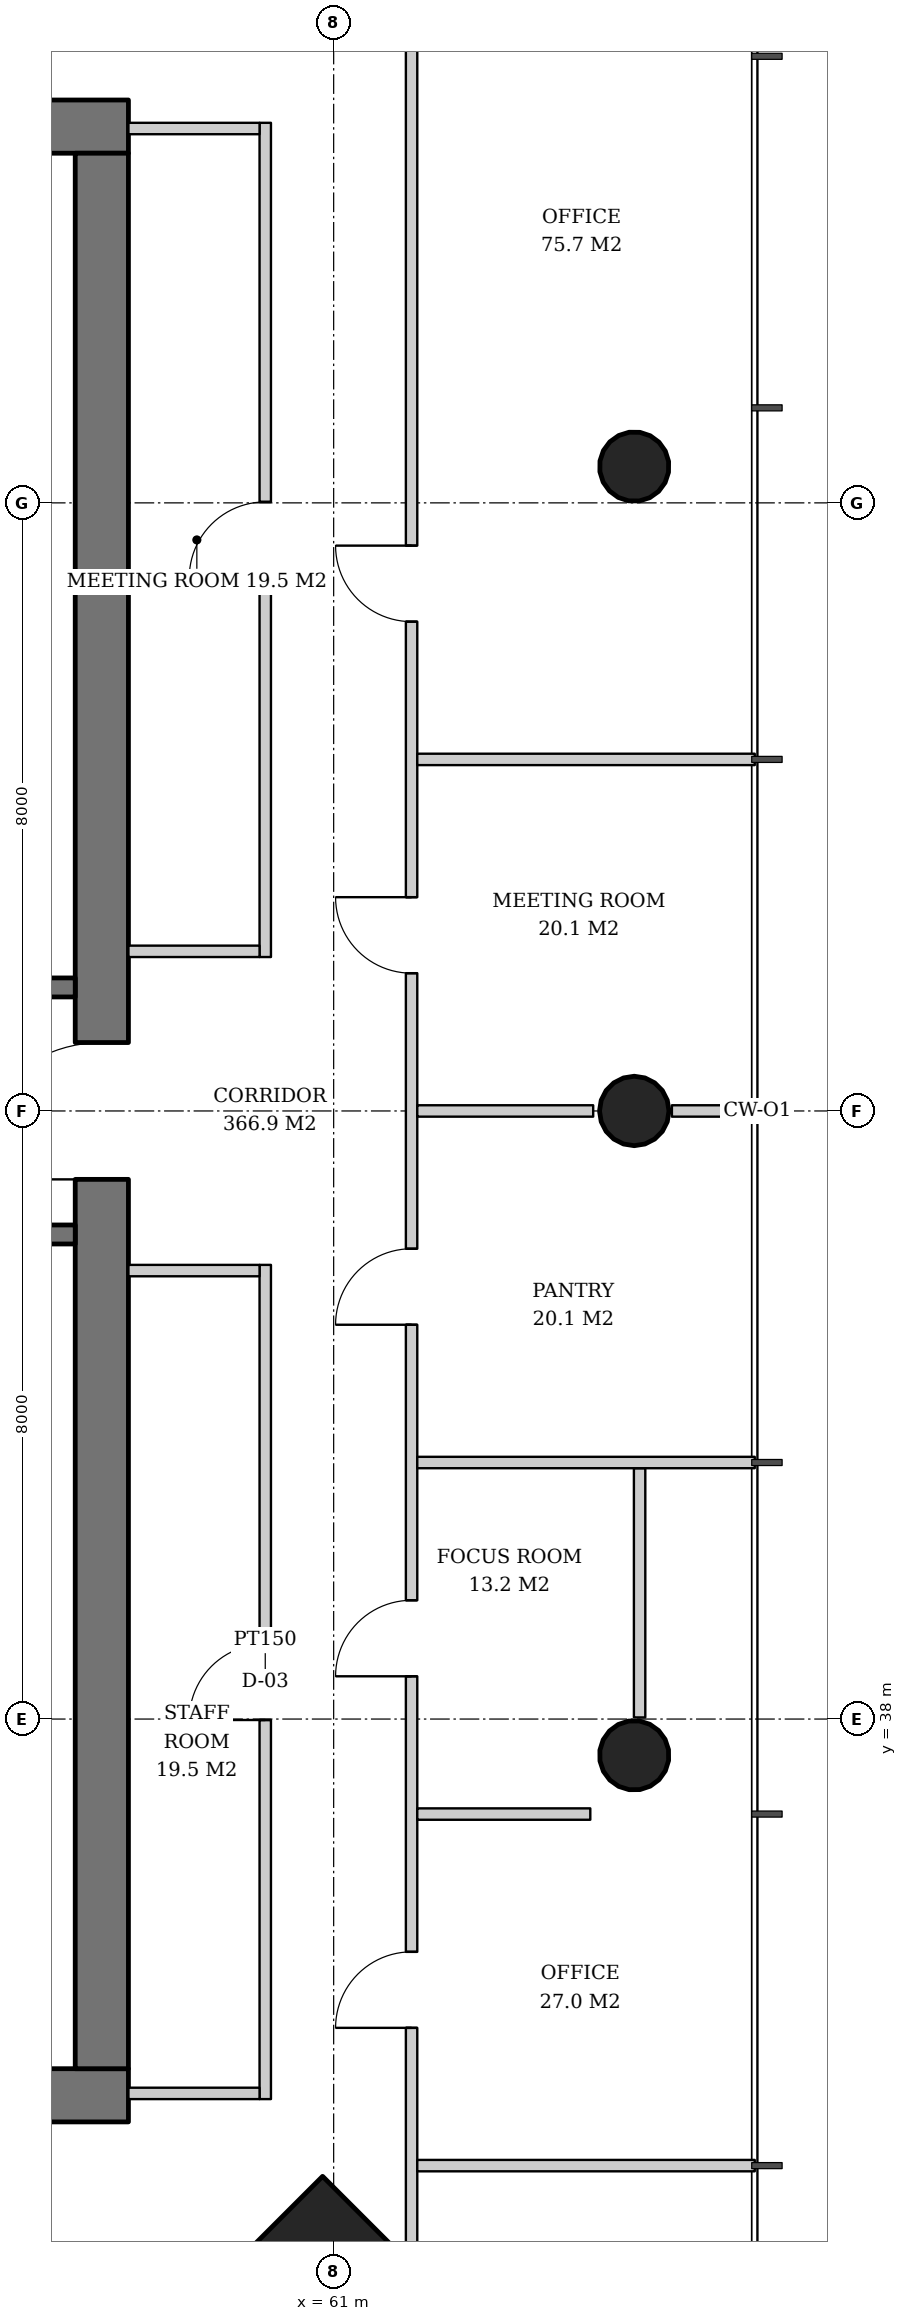
"""IFC4 building model, lengths in metres.
Left out: names, types, materials, properties, quantities, classifications, styles, units other than length and angle.
Written with IfcOpenShell. Run it as: python <this file> out.ifc"""

import sys

from ifc_helpers import new_model, si_unit, direction, frame, frame_2d, origin, origin_2d, place, context, subcontext, project, spatial, rectangle, hollow_circle, extrude, element, fill, save


model = new_model("IFC4")
c1 = context("Model", 3, precision=1e-05, world=origin(), true_north=direction((0.0, 1.0)))
c2 = subcontext(c1, "Body", "Model", "MODEL_VIEW")
j1 = project(units=[si_unit("LENGTHUNIT", "METRE"), si_unit("PLANEANGLEUNIT", "RADIAN")], contexts=[c1])
p1 = place(None, origin())
s1 = spatial("IfcSite", under=j1, at=p1, CompositionType="ELEMENT")
p2 = place(p1, origin())
s2 = spatial("IfcBuilding", under=s1, at=p2, CompositionType="ELEMENT")
p3 = place(p2, frame((0.0, 0.0, 146.4)))
s3 = spatial("IfcBuildingStorey", under=s2, at=p3, CompositionType="ELEMENT", Elevation=146.4)
p4 = place(p3, frame((64.993, 37.504, 0.0), z_axis=(-0.031974442509, 0.015923015547, 0.999361842679), x_axis=(-0.445775033553, -0.895145027055, 0.0)))
e1 = element("IfcColumn", 1, at=p4, inside=s3, PredefinedType="COLUMN", context=c2, shape_type="SweptSolid", body=[
    extrude(hollow_circle(Radius=0.457, WallThickness=0.03, at=origin_2d()), origin(), (0.0, 0.0, 1.0), 3.802),
])
p5 = place(p3, frame((64.993, 46.0, 0.0), z_axis=(-0.031978496719, 0.0, 0.999488557087), x_axis=(0.0, -1.0, 0.0)))
e2 = element("IfcColumn", 2, at=p5, inside=s3, PredefinedType="COLUMN", context=c2, shape_type="SweptSolid", body=[
    extrude(hollow_circle(Radius=0.457, WallThickness=0.03, at=origin_2d()), origin(), (0.0, 0.0, 1.0), 3.802),
])
p6 = place(p3, frame((64.993, 54.496, 0.0), z_axis=(-0.031974442509, -0.015923015547, 0.999361842679), x_axis=(0.445775033553, -0.895145027055, 0.0)))
e3 = element("IfcColumn", 3, at=p6, inside=s3, PredefinedType="COLUMN", context=c2, shape_type="SweptSolid", body=[
    extrude(hollow_circle(Radius=0.457, WallThickness=0.03, at=origin_2d()), origin(), (0.0, 0.0, 1.0), 3.802),
])
p7 = place(p3, frame((60.893, 30.107, 0.0), z_axis=(-0.031898107953, 0.031898107953, 0.998981992539), x_axis=(-0.707106781187, -0.707106781187, 0.0)))
e4 = element("IfcColumn", 4, at=p7, inside=s3, PredefinedType="COLUMN", context=c2, shape_type="SweptSolid", body=[
    extrude(rectangle(XDim=2.6, YDim=2.6, at=origin_2d()), origin(), (0.0, 0.0, 1.0), 3.804),
])
p8 = place(p3, frame((31.7, 33.05, 0.0), z_axis=(0.0, 0.0, 1.0), x_axis=(1.0, 0.0, 0.0)))
e5 = element("IfcWall", 5, at=p8, inside=s3, PredefinedType="SHEAR", context=c2, shape_type="SweptSolid", body=[
    extrude(rectangle(XDim=26.6, YDim=0.7, at=frame_2d((13.3, 0.0))), origin(), (0.0, 0.0, 1.0), 3.8),
])
p9 = place(p8, frame((7.3, 0.0, 0.0)))
e6 = element("IfcOpeningElement", 6, at=p9, cuts=e5, PredefinedType="OPENING", context=c2, shape_type="SweptSolid", body=[
    extrude(rectangle(XDim=1.0, YDim=2.1, at=frame_2d((0.5, 1.05))), frame((0.0, 0.36, 0.0), z_axis=(0.0, -1.0, 0.0), x_axis=(1.0, 0.0, 0.0)), (0.0, 0.0, 1.0), 0.72),
])
p10 = place(p8, frame((18.75, 0.0, 0.0)))
e7 = element("IfcOpeningElement", 7, at=p10, cuts=e5, PredefinedType="OPENING", context=c2, shape_type="SweptSolid", body=[
    extrude(rectangle(XDim=1.0, YDim=2.1, at=frame_2d((0.5, 1.05))), frame((0.0, 0.36, 0.0), z_axis=(0.0, -1.0, 0.0), x_axis=(1.0, 0.0, 0.0)), (0.0, 0.0, 1.0), 0.72),
])
p11 = place(p8, frame((3.2, 0.0, 0.0)))
e8 = element("IfcOpeningElement", 8, at=p11, cuts=e5, PredefinedType="OPENING", context=c2, shape_type="SweptSolid", body=[
    extrude(rectangle(XDim=1.0, YDim=2.1, at=frame_2d((0.5, 1.05))), frame((0.0, 0.36, 0.0), z_axis=(0.0, -1.0, 0.0), x_axis=(1.0, 0.0, 0.0)), (0.0, 0.0, 1.0), 0.72),
])
p12 = place(p8, frame((10.42, 0.0, 0.0)))
e9 = element("IfcOpeningElement", 9, at=p12, cuts=e5, PredefinedType="OPENING", context=c2, shape_type="SweptSolid", body=[
    extrude(rectangle(XDim=1.0, YDim=2.1, at=frame_2d((0.5, 1.05))), frame((0.0, 0.36, 0.0), z_axis=(0.0, -1.0, 0.0), x_axis=(1.0, 0.0, 0.0)), (0.0, 0.0, 1.0), 0.72),
])
p13 = place(p8, frame((14.46, 0.0, 0.0)))
e10 = element("IfcOpeningElement", 10, at=p13, cuts=e5, PredefinedType="OPENING", context=c2, shape_type="SweptSolid", body=[
    extrude(rectangle(XDim=1.0, YDim=2.1, at=frame_2d((0.5, 1.05))), frame((0.0, 0.36, 0.0), z_axis=(0.0, -1.0, 0.0), x_axis=(1.0, 0.0, 0.0)), (0.0, 0.0, 1.0), 0.72),
])
p14 = place(p8, frame((22.5, 0.0, 0.0)))
e11 = element("IfcOpeningElement", 11, at=p14, cuts=e5, PredefinedType="OPENING", context=c2, shape_type="SweptSolid", body=[
    extrude(rectangle(XDim=1.0, YDim=2.1, at=frame_2d((0.5, 1.05))), frame((0.0, 0.36, 0.0), z_axis=(0.0, -1.0, 0.0), x_axis=(1.0, 0.0, 0.0)), (0.0, 0.0, 1.0), 0.72),
])
p15 = place(p3, frame((31.7, 58.95, 0.0), z_axis=(0.0, 0.0, 1.0), x_axis=(1.0, 0.0, 0.0)))
e12 = element("IfcWall", 12, at=p15, inside=s3, PredefinedType="SHEAR", context=c2, shape_type="SweptSolid", body=[
    extrude(rectangle(XDim=26.6, YDim=0.7, at=frame_2d((13.3, 0.0))), origin(), (0.0, 0.0, 1.0), 3.8),
])
p16 = place(p15, frame((17.94, 0.0, 0.0)))
e13 = element("IfcOpeningElement", 13, at=p16, cuts=e12, PredefinedType="OPENING", context=c2, shape_type="SweptSolid", body=[
    extrude(rectangle(XDim=1.0, YDim=2.1, at=frame_2d((0.5, 1.05))), frame((0.0, 0.36, 0.0), z_axis=(0.0, -1.0, 0.0), x_axis=(1.0, 0.0, 0.0)), (0.0, 0.0, 1.0), 0.72),
])
p17 = place(p15, frame((5.825, 0.0, 0.0)))
e14 = element("IfcOpeningElement", 14, at=p17, cuts=e12, PredefinedType="OPENING", context=c2, shape_type="SweptSolid", body=[
    extrude(rectangle(XDim=1.0, YDim=2.1, at=frame_2d((0.5, 1.05))), frame((0.0, 0.36, 0.0), z_axis=(0.0, -1.0, 0.0), x_axis=(1.0, 0.0, 0.0)), (0.0, 0.0, 1.0), 0.72),
])
p18 = place(p15, frame((1.551, 0.0, 0.0)))
e15 = element("IfcOpeningElement", 15, at=p18, cuts=e12, PredefinedType="OPENING", context=c2, shape_type="SweptSolid", body=[
    extrude(rectangle(XDim=1.0, YDim=2.1, at=frame_2d((0.5, 1.05))), frame((0.0, 0.36, 0.0), z_axis=(0.0, -1.0, 0.0), x_axis=(1.0, 0.0, 0.0)), (0.0, 0.0, 1.0), 0.72),
])
p19 = place(p15, frame((3.638, 0.0, 0.0)))
e16 = element("IfcOpeningElement", 16, at=p19, cuts=e12, PredefinedType="OPENING", context=c2, shape_type="SweptSolid", body=[
    extrude(rectangle(XDim=1.0, YDim=2.1, at=frame_2d((0.5, 1.05))), frame((0.0, 0.36, 0.0), z_axis=(0.0, -1.0, 0.0), x_axis=(1.0, 0.0, 0.0)), (0.0, 0.0, 1.0), 0.72),
])
p20 = place(p15, frame((8.342, 0.0, 0.0)))
e17 = element("IfcOpeningElement", 17, at=p20, cuts=e12, PredefinedType="OPENING", context=c2, shape_type="SweptSolid", body=[
    extrude(rectangle(XDim=1.0, YDim=2.1, at=frame_2d((0.5, 1.05))), frame((0.0, 0.36, 0.0), z_axis=(0.0, -1.0, 0.0), x_axis=(1.0, 0.0, 0.0)), (0.0, 0.0, 1.0), 0.72),
])
p21 = place(p15, frame((11.626, 0.0, 0.0)))
e18 = element("IfcOpeningElement", 18, at=p21, cuts=e12, PredefinedType="OPENING", context=c2, shape_type="SweptSolid", body=[
    extrude(rectangle(XDim=1.0, YDim=2.1, at=frame_2d((0.5, 1.05))), frame((0.0, 0.36, 0.0), z_axis=(0.0, -1.0, 0.0), x_axis=(1.0, 0.0, 0.0)), (0.0, 0.0, 1.0), 0.72),
])
p22 = place(p15, frame((14.862, 0.0, 0.0)))
e19 = element("IfcOpeningElement", 19, at=p22, cuts=e12, PredefinedType="OPENING", context=c2, shape_type="SweptSolid", body=[
    extrude(rectangle(XDim=1.0, YDim=2.1, at=frame_2d((0.5, 1.05))), frame((0.0, 0.36, 0.0), z_axis=(0.0, -1.0, 0.0), x_axis=(1.0, 0.0, 0.0)), (0.0, 0.0, 1.0), 0.72),
])
p23 = place(p15, frame((20.9, 0.0, 0.0)))
e20 = element("IfcOpeningElement", 20, at=p23, cuts=e12, PredefinedType="OPENING", context=c2, shape_type="SweptSolid", body=[
    extrude(rectangle(XDim=1.0, YDim=2.1, at=frame_2d((0.5, 1.05))), frame((0.0, 0.36, 0.0), z_axis=(0.0, -1.0, 0.0), x_axis=(1.0, 0.0, 0.0)), (0.0, 0.0, 1.0), 0.72),
])
p24 = place(p15, frame((23.75, 0.0, 0.0)))
e21 = element("IfcOpeningElement", 21, at=p24, cuts=e12, PredefinedType="OPENING", context=c2, shape_type="SweptSolid", body=[
    extrude(rectangle(XDim=1.0, YDim=2.1, at=frame_2d((0.5, 1.05))), frame((0.0, 0.36, 0.0), z_axis=(0.0, -1.0, 0.0), x_axis=(1.0, 0.0, 0.0)), (0.0, 0.0, 1.0), 0.72),
])
p25 = place(p3, frame((57.95, 33.4, 0.0), z_axis=(0.0, 0.0, 1.0), x_axis=(0.0, 1.0, 0.0)))
e22 = element("IfcWall", 22, at=p25, inside=s3, PredefinedType="SHEAR", context=c2, shape_type="SweptSolid", body=[
    extrude(rectangle(XDim=25.2, YDim=0.7, at=frame_2d((12.6, 0.0))), origin(), (0.0, 0.0, 1.0), 3.8),
])
p26 = place(p25, frame((11.7, 0.0, 0.0)))
e23 = element("IfcOpeningElement", 23, at=p26, cuts=e22, PredefinedType="OPENING", context=c2, shape_type="SweptSolid", body=[
    extrude(rectangle(XDim=1.8, YDim=2.4, at=frame_2d((0.9, 1.2))), frame((0.0, 0.36, 0.0), z_axis=(0.0, -1.0, 0.0), x_axis=(1.0, 0.0, 0.0)), (0.0, 0.0, 1.0), 0.72),
])
for number, where, z_axis, x_axis in (
    (24, (54.9, 44.375, 0.0), (0.0, 0.0, 1.0), (1.0, 0.0, 0.0)),
    (25, (54.9, 47.625, 0.0), (0.0, 0.0, 1.0), (1.0, 0.0, 0.0)),
):
    element("IfcWall", number, at=place(p3, frame(where, z_axis=z_axis, x_axis=x_axis)), inside=s3, PredefinedType="SOLIDWALL", context=c2, shape_type="SweptSolid", body=[
        extrude(rectangle(XDim=2.7, YDim=0.25, at=frame_2d((1.35, 0.0))), origin(), (0.0, 0.0, 1.0), 3.62),
    ])
p27 = place(p3, frame((60.1, 33.0, 0.0), z_axis=(0.0, 0.0, 1.0), x_axis=(0.0, 1.0, 0.0)))
e26 = element("IfcWall", 26, at=p27, inside=s3, PredefinedType="PARTITIONING", context=c2, shape_type="SweptSolid", body=[
    extrude(rectangle(XDim=10.975, YDim=0.15, at=frame_2d((5.488, 0.0))), origin(), (0.0, 0.0, 1.0), 2.72),
])
p28 = place(p27, frame((4.988, 0.0, 0.0)))
e27 = element("IfcOpeningElement", 27, at=p28, cuts=e26, PredefinedType="OPENING", context=c2, shape_type="SweptSolid", body=[
    extrude(rectangle(XDim=1.0, YDim=2.1, at=frame_2d((0.5, 1.05))), frame((0.0, 0.085, 0.0), z_axis=(0.0, -1.0, 0.0), x_axis=(1.0, 0.0, 0.0)), (0.0, 0.0, 1.0), 0.17),
])
p29 = place(p3, frame((58.3, 33.075, 0.0), z_axis=(0.0, 0.0, 1.0), x_axis=(1.0, 0.0, 0.0)))
e28 = element("IfcWall", 28, at=p29, inside=s3, PredefinedType="PARTITIONING", context=c2, shape_type="SweptSolid", body=[
    extrude(rectangle(XDim=1.725, YDim=0.15, at=frame_2d((0.862, 0.0))), origin(), (0.0, 0.0, 1.0), 2.72),
])
p30 = place(p3, frame((58.3, 43.9, 0.0), z_axis=(0.0, 0.0, 1.0), x_axis=(1.0, 0.0, 0.0)))
e29 = element("IfcWall", 29, at=p30, inside=s3, PredefinedType="PARTITIONING", context=c2, shape_type="SweptSolid", body=[
    extrude(rectangle(XDim=1.725, YDim=0.15, at=frame_2d((0.862, 0.0))), origin(), (0.0, 0.0, 1.0), 3.62),
])
p31 = place(p3, frame((60.1, 48.025, 0.0), z_axis=(0.0, 0.0, 1.0), x_axis=(0.0, 1.0, 0.0)))
e30 = element("IfcWall", 30, at=p31, inside=s3, PredefinedType="PARTITIONING", context=c2, shape_type="SweptSolid", body=[
    extrude(rectangle(XDim=10.975, YDim=0.15, at=frame_2d((5.488, 0.0))), origin(), (0.0, 0.0, 1.0), 2.806),
])
p32 = place(p31, frame((4.988, 0.0, 0.0)))
e31 = element("IfcOpeningElement", 31, at=p32, cuts=e30, PredefinedType="OPENING", context=c2, shape_type="SweptSolid", body=[
    extrude(rectangle(XDim=1.0, YDim=2.1, at=frame_2d((0.5, 1.05))), frame((0.0, 0.085, 0.0), z_axis=(0.0, -1.0, 0.0), x_axis=(1.0, 0.0, 0.0)), (0.0, 0.0, 1.0), 0.17),
])
for number, where, z_axis, x_axis in (
    (32, (58.3, 48.1, 0.0), (0.0, 0.0, 1.0), (1.0, 0.0, 0.0)),
    (33, (58.3, 58.925, 0.0), (0.0, 0.0, 1.0), (1.0, 0.0, 0.0)),
):
    element("IfcWall", number, at=place(p3, frame(where, z_axis=z_axis, x_axis=x_axis)), inside=s3, PredefinedType="PARTITIONING", context=c2, shape_type="SweptSolid", body=[
        extrude(rectangle(XDim=1.725, YDim=0.15, at=frame_2d((0.862, 0.0))), origin(), (0.0, 0.0, 1.0), 3.62),
    ])
p33 = place(p3, frame((65.025, 38.021, 0.0), z_axis=(0.0, 0.0, 1.0), x_axis=(0.0, 1.0, 0.0)))
e34 = element("IfcWall", 34, at=p33, inside=s3, PredefinedType="PARTITIONING", context=c2, shape_type="SweptSolid", body=[
    extrude(rectangle(XDim=3.279, YDim=0.15, at=frame_2d((1.639, 0.0))), origin(), (0.0, 0.0, 1.0), 2.82),
])
p34 = place(p3, frame((62.025, 30.888, 0.0), z_axis=(0.0, 0.0, 1.0), x_axis=(0.0, 1.0, 0.0)))
e35 = element("IfcWall", 35, at=p34, inside=s3, PredefinedType="PARTITIONING", context=c2, shape_type="SweptSolid", body=[
    extrude(rectangle(XDim=30.223, YDim=0.15, at=frame_2d((15.112, 0.0))), origin(), (0.0, 0.0, 1.0), 2.72),
])
p35 = place(p34, frame((3.049, 0.0, 0.0)))
e36 = element("IfcOpeningElement", 36, at=p35, cuts=e35, PredefinedType="OPENING", context=c2, shape_type="SweptSolid", body=[
    extrude(rectangle(XDim=1.0, YDim=2.1, at=frame_2d((0.5, 1.05))), frame((0.0, 0.085, 0.0), z_axis=(0.0, -1.0, 0.0), x_axis=(1.0, 0.0, 0.0)), (0.0, 0.0, 1.0), 0.17),
])
p36 = place(p34, frame((7.674, 0.0, 0.0)))
e37 = element("IfcOpeningElement", 37, at=p36, cuts=e35, PredefinedType="OPENING", context=c2, shape_type="SweptSolid", body=[
    extrude(rectangle(XDim=1.0, YDim=2.1, at=frame_2d((0.5, 1.05))), frame((0.0, 0.085, 0.0), z_axis=(0.0, -1.0, 0.0), x_axis=(1.0, 0.0, 0.0)), (0.0, 0.0, 1.0), 0.17),
])
p37 = place(p34, frame((12.299, 0.0, 0.0)))
e38 = element("IfcOpeningElement", 38, at=p37, cuts=e35, PredefinedType="OPENING", context=c2, shape_type="SweptSolid", body=[
    extrude(rectangle(XDim=1.0, YDim=2.1, at=frame_2d((0.5, 1.05))), frame((0.0, 0.085, 0.0), z_axis=(0.0, -1.0, 0.0), x_axis=(1.0, 0.0, 0.0)), (0.0, 0.0, 1.0), 0.17),
])
p38 = place(p34, frame((16.924, 0.0, 0.0)))
e39 = element("IfcOpeningElement", 39, at=p38, cuts=e35, PredefinedType="OPENING", context=c2, shape_type="SweptSolid", body=[
    extrude(rectangle(XDim=1.0, YDim=2.1, at=frame_2d((0.5, 1.05))), frame((0.0, 0.085, 0.0), z_axis=(0.0, -1.0, 0.0), x_axis=(1.0, 0.0, 0.0)), (0.0, 0.0, 1.0), 0.17),
])
p39 = place(p34, frame((21.549, 0.0, 0.0)))
e40 = element("IfcOpeningElement", 40, at=p39, cuts=e35, PredefinedType="OPENING", context=c2, shape_type="SweptSolid", body=[
    extrude(rectangle(XDim=1.0, YDim=2.1, at=frame_2d((0.5, 1.05))), frame((0.0, 0.085, 0.0), z_axis=(0.0, -1.0, 0.0), x_axis=(1.0, 0.0, 0.0)), (0.0, 0.0, 1.0), 0.17),
])
p40 = place(p3, frame((62.1, 32.125, 0.0), z_axis=(0.0, 0.0, 1.0), x_axis=(1.0, 0.0, 0.0)))
e41 = element("IfcWall", 41, at=p40, inside=s3, PredefinedType="PARTITIONING", context=c2, shape_type="SweptSolid", body=[
    extrude(rectangle(XDim=4.44, YDim=0.15, at=frame_2d((2.22, 0.0))), origin(), (0.0, 0.0, 1.0), 2.82),
])
p41 = place(p3, frame((62.1, 36.75, 0.0), z_axis=(0.0, 0.0, 1.0), x_axis=(1.0, 0.0, 0.0)))
e42 = element("IfcWall", 42, at=p41, inside=s3, PredefinedType="PARTITIONING", context=c2, shape_type="SweptSolid", body=[
    extrude(rectangle(XDim=2.276, YDim=0.15, at=frame_2d((1.138, 0.0))), origin(), (0.0, 0.0, 1.0), 3.62),
])
p42 = place(p3, frame((62.1, 41.375, 0.0), z_axis=(0.0, 0.0, 1.0), x_axis=(1.0, 0.0, 0.0)))
e43 = element("IfcWall", 43, at=p42, inside=s3, PredefinedType="PARTITIONING", context=c2, shape_type="SweptSolid", body=[
    extrude(rectangle(XDim=4.44, YDim=0.15, at=frame_2d((2.22, 0.0))), origin(), (0.0, 0.0, 1.0), 2.82),
])
p43 = place(p3, frame((62.1, 46.0, 0.0), z_axis=(0.0, 0.0, 1.0), x_axis=(1.0, 0.0, 0.0)))
e44 = element("IfcWall", 44, at=p43, inside=s3, PredefinedType="PARTITIONING", context=c2, shape_type="SweptSolid", body=[
    extrude(rectangle(XDim=2.314, YDim=0.15, at=frame_2d((1.157, 0.0))), origin(), (0.0, 0.0, 1.0), 3.62),
])
p44 = place(p3, frame((65.45, 46.0, 0.0), z_axis=(0.0, 0.0, 1.0), x_axis=(1.0, 0.0, 0.0)))
e45 = element("IfcWall", 45, at=p44, inside=s3, PredefinedType="PARTITIONING", context=c2, shape_type="SweptSolid", body=[
    extrude(rectangle(XDim=1.09, YDim=0.15, at=frame_2d((0.545, 0.0))), origin(), (0.0, 0.0, 1.0), 3.62),
])
p45 = place(p3, frame((62.1, 50.625, 0.0), z_axis=(0.0, 0.0, 1.0), x_axis=(1.0, 0.0, 0.0)))
e46 = element("IfcWall", 46, at=p45, inside=s3, PredefinedType="PARTITIONING", context=c2, shape_type="SweptSolid", body=[
    extrude(rectangle(XDim=4.44, YDim=0.15, at=frame_2d((2.22, 0.0))), origin(), (0.0, 0.0, 1.0), 2.82),
])
p46 = place(p26, origin())
e47 = element("IfcDoor", 47, at=p46, inside=s3, OperationType="DOUBLE_DOOR_SINGLE_SWING", PredefinedType="DOOR", context=c2, shape_type="SweptSolid", body=[
    extrude(rectangle(XDim=1.8, YDim=2.4, at=frame_2d((0.9, 1.2))), frame((0.0, 0.025, 0.0), z_axis=(0.0, -1.0, 0.0), x_axis=(1.0, 0.0, 0.0)), (0.0, 0.0, 1.0), 0.05),
])
fill(e23, e47)
p47 = place(p28, origin())
e48 = element("IfcDoor", 48, at=p47, inside=s3, OperationType="SINGLE_SWING_LEFT", PredefinedType="DOOR", context=c2, shape_type="SweptSolid", body=[
    extrude(rectangle(XDim=1.0, YDim=2.1, at=frame_2d((0.5, 1.05))), frame((0.0, 0.025, 0.0), z_axis=(0.0, -1.0, 0.0), x_axis=(1.0, 0.0, 0.0)), (0.0, 0.0, 1.0), 0.05),
])
fill(e27, e48)
p48 = place(p32, origin())
e49 = element("IfcDoor", 49, at=p48, inside=s3, OperationType="SINGLE_SWING_LEFT", PredefinedType="DOOR", context=c2, shape_type="SweptSolid", body=[
    extrude(rectangle(XDim=1.0, YDim=2.1, at=frame_2d((0.5, 1.05))), frame((0.0, 0.025, 0.0), z_axis=(0.0, -1.0, 0.0), x_axis=(1.0, 0.0, 0.0)), (0.0, 0.0, 1.0), 0.05),
])
fill(e31, e49)
p49 = place(p35, origin())
e50 = element("IfcDoor", 50, at=p49, inside=s3, OperationType="SINGLE_SWING_LEFT", PredefinedType="DOOR", context=c2, shape_type="SweptSolid", body=[
    extrude(rectangle(XDim=1.0, YDim=2.1, at=frame_2d((0.5, 1.05))), frame((0.0, 0.025, 0.0), z_axis=(0.0, -1.0, 0.0), x_axis=(1.0, 0.0, 0.0)), (0.0, 0.0, 1.0), 0.05),
])
fill(e36, e50)
p50 = place(p36, origin())
e51 = element("IfcDoor", 51, at=p50, inside=s3, OperationType="SINGLE_SWING_LEFT", PredefinedType="DOOR", context=c2, shape_type="SweptSolid", body=[
    extrude(rectangle(XDim=1.0, YDim=2.1, at=frame_2d((0.5, 1.05))), frame((0.0, 0.025, 0.0), z_axis=(0.0, -1.0, 0.0), x_axis=(1.0, 0.0, 0.0)), (0.0, 0.0, 1.0), 0.05),
])
fill(e37, e51)
p51 = place(p37, origin())
e52 = element("IfcDoor", 52, at=p51, inside=s3, OperationType="SINGLE_SWING_LEFT", PredefinedType="DOOR", context=c2, shape_type="SweptSolid", body=[
    extrude(rectangle(XDim=1.0, YDim=2.1, at=frame_2d((0.5, 1.05))), frame((0.0, 0.025, 0.0), z_axis=(0.0, -1.0, 0.0), x_axis=(1.0, 0.0, 0.0)), (0.0, 0.0, 1.0), 0.05),
])
fill(e38, e52)
p52 = place(p38, origin())
e53 = element("IfcDoor", 53, at=p52, inside=s3, OperationType="SINGLE_SWING_RIGHT", PredefinedType="DOOR", context=c2, shape_type="SweptSolid", body=[
    extrude(rectangle(XDim=1.0, YDim=2.1, at=frame_2d((0.5, 1.05))), frame((0.0, 0.025, 0.0), z_axis=(0.0, -1.0, 0.0), x_axis=(1.0, 0.0, 0.0)), (0.0, 0.0, 1.0), 0.05),
])
fill(e39, e53)
p53 = place(p39, origin())
e54 = element("IfcDoor", 54, at=p53, inside=s3, OperationType="SINGLE_SWING_RIGHT", PredefinedType="DOOR", context=c2, shape_type="SweptSolid", body=[
    extrude(rectangle(XDim=1.0, YDim=2.1, at=frame_2d((0.5, 1.05))), frame((0.0, 0.025, 0.0), z_axis=(0.0, -1.0, 0.0), x_axis=(1.0, 0.0, 0.0)), (0.0, 0.0, 1.0), 0.05),
])
fill(e40, e54)
save(model, sys.argv[1])
